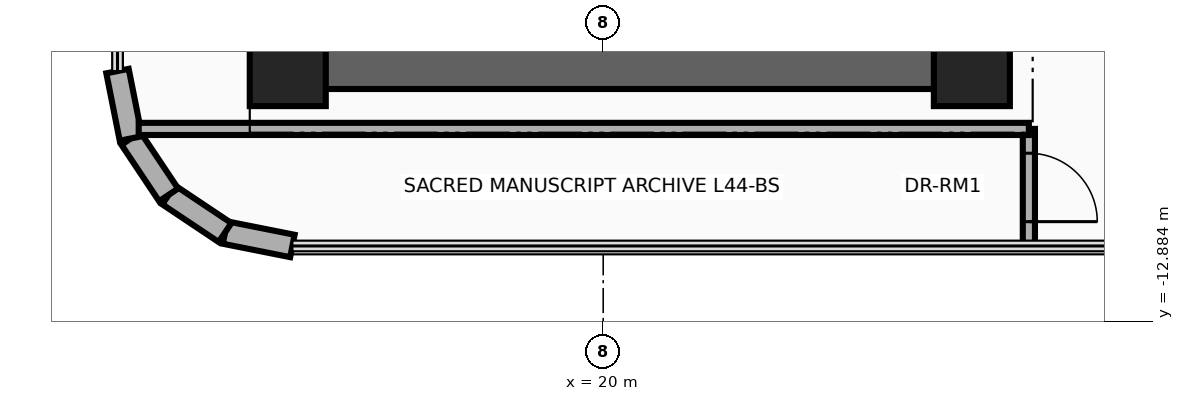
"""IFC4 building model, lengths in metres.
Left out: names, types, materials, properties, quantities, classifications, styles, units other than length and angle.
Written with IfcOpenShell. Run it as: python <this file> out.ifc"""

import sys

from ifc_helpers import new_model, si_unit, direction, frame, frame_2d, origin, origin_2d, place, context, subcontext, project, spatial, rectangle, extrude, source, transform, mapped, element, fill, save


model = new_model("IFC4")
c1 = context("Model", 3, precision=1e-05, world=origin(), true_north=direction((0.0, 1.0)))
c2 = subcontext(c1, "Body", "Model", "MODEL_VIEW")
j1 = project(units=[si_unit("LENGTHUNIT", "METRE"), si_unit("PLANEANGLEUNIT", "RADIAN")], contexts=[c1])
p1 = place(None, origin())
s1 = spatial("IfcSite", under=j1, at=p1, CompositionType="ELEMENT")
p2 = place(p1, origin())
s2 = spatial("IfcBuilding", under=s1, at=p2, CompositionType="ELEMENT")
p3 = place(p2, frame((0.0, 0.0, 172.3)))
s3 = spatial("IfcBuildingStorey", under=s2, at=p3, CompositionType="ELEMENT", Elevation=172.3)
p4 = place(p3, frame((24.85, -9.825, 0.0), z_axis=(0.0, 0.0, 1.0), x_axis=(0.0, 1.0, 0.0)))
e1 = element("IfcWall", 1, at=p4, inside=s3, PredefinedType="SHEAR", context=c2, shape_type="SweptSolid", body=[
    extrude(rectangle(XDim=8.875, YDim=0.55, at=frame_2d((4.438, 0.0))), origin(), (0.0, 0.0, 1.0), 3.93),
])
p5 = place(p3, frame((15.85, -9.55, 0.0), z_axis=(0.0, 0.0, 1.0), x_axis=(1.0, 0.0, 0.0)))
e2 = element("IfcWall", 2, at=p5, inside=s3, PredefinedType="SHEAR", context=c2, shape_type="SweptSolid", body=[
    extrude(rectangle(XDim=9.0, YDim=0.55, at=frame_2d((4.5, 0.0))), origin(), (0.0, 0.0, 1.0), 3.93),
])
m1 = source(origin(), c2, "Body", "SweptSolid", [
    extrude(rectangle(XDim=1.0, YDim=1.0, at=origin_2d()), origin(), (0.0, 0.0, 1.0), 4.25),
])
for number, where, z_axis, x_axis in (
    (3, (15.85, -9.55, 0.0), (0.0, 0.0, 1.0), (1.0, 0.0, 0.0)),
    (4, (24.85, -9.55, 0.0), (0.0, 0.0, 1.0), (1.0, 0.0, 0.0)),
):
    element("IfcColumn", number, at=place(p3, frame(where, z_axis=z_axis, x_axis=x_axis)), inside=s3, PredefinedType="COLUMN", context=c2, shape_type="MappedRepresentation", body=[
        mapped(m1, transform((0.0, 0.0, 0.0), x_axis=(1.0, 0.0, 0.0), y_axis=(0.0, 1.0, 0.0), z_axis=(0.0, 0.0, 1.0), scale=1.0)),
    ])
p6 = place(p3, frame((15.911, -11.89, 0.0), z_axis=(0.0, 0.0, 1.0), x_axis=(-0.980798241101, 0.195025152871, 0.0)))
e5 = element("IfcWall", 5, at=p6, inside=s3, PredefinedType="SOLIDWALL", context=c2, shape_type="SweptSolid", body=[
    extrude(rectangle(XDim=0.904, YDim=0.3, at=frame_2d((0.452, 0.0))), origin(), (0.0, 0.0, 1.0), 3.93),
])
for number, where, z_axis, x_axis in (
    (6, (15.024, -11.714, 0.0), (0.0, 0.0, 1.0), (-0.832, 0.556, 0.0)),
    (7, (14.282, -11.218, 0.0), (0.0, 0.0, 1.0), (-0.556, 0.832, 0.0)),
):
    element("IfcWall", number, at=place(p3, frame(where, z_axis=z_axis, x_axis=x_axis)), inside=s3, PredefinedType="SOLIDWALL", context=c2, shape_type="SweptSolid", body=[
        extrude(rectangle(XDim=0.893, YDim=0.3, at=frame_2d((0.446, 0.0))), origin(), (0.0, 0.0, 1.0), 3.93),
    ])
p7 = place(p3, frame((13.786, -10.476, 0.0), z_axis=(0.0, 0.0, 1.0), x_axis=(-0.195025152871, 0.980798241101, 0.0)))
e8 = element("IfcWall", 8, at=p7, inside=s3, PredefinedType="SOLIDWALL", context=c2, shape_type="SweptSolid", body=[
    extrude(rectangle(XDim=0.904, YDim=0.3, at=frame_2d((0.452, 0.0))), origin(), (0.0, 0.0, 1.0), 3.93),
])
p8 = place(p3, frame((25.6, -11.89, 0.0), z_axis=(0.0, 0.0, 1.0), x_axis=(0.0, 1.0, 0.0)))
e9 = element("IfcWall", 9, at=p8, inside=s3, PredefinedType="PARTITIONING", context=c2, shape_type="SweptSolid", body=[
    extrude(rectangle(XDim=1.54, YDim=0.16, at=frame_2d((0.77, 0.0))), origin(), (0.0, 0.0, 1.0), 3.93),
])
p9 = place(p8, frame((0.32, 0.0, 0.0)))
e10 = element("IfcOpeningElement", 10, at=p9, cuts=e9, PredefinedType="OPENING", context=c2, shape_type="SweptSolid", body=[
    extrude(rectangle(XDim=0.9, YDim=2.1, at=frame_2d((0.45, 1.05))), frame((0.0, 0.095, 0.0), z_axis=(0.0, -1.0, 0.0), x_axis=(1.0, 0.0, 0.0)), (0.0, 0.0, 1.0), 0.19),
])
p10 = place(p3, frame((13.889, -10.35, 0.0), z_axis=(0.0, 0.0, 1.0), x_axis=(1.0, 0.0, 0.0)))
e11 = element("IfcWall", 11, at=p10, inside=s3, PredefinedType="PARTITIONING", context=c2, shape_type="SweptSolid", body=[
    extrude(rectangle(XDim=11.711, YDim=0.16, at=frame_2d((5.855, 0.0))), origin(), (0.0, 0.0, 1.0), 3.93),
])
p11 = place(p9, frame((0.9, 0.0, 0.0), z_axis=(0.0, 0.0, 1.0), x_axis=(-1.0, 0.0, 0.0)))
e12 = element("IfcDoor", 12, at=p11, inside=s3, OperationType="SINGLE_SWING_LEFT", PredefinedType="DOOR", context=c2, shape_type="SweptSolid", body=[
    extrude(rectangle(XDim=0.9, YDim=2.1, at=frame_2d((0.45, 1.05))), frame((0.0, 0.025, 0.0), z_axis=(0.0, -1.0, 0.0), x_axis=(1.0, 0.0, 0.0)), (0.0, 0.0, 1.0), 0.05),
])
fill(e10, e12)
save(model, sys.argv[1])
